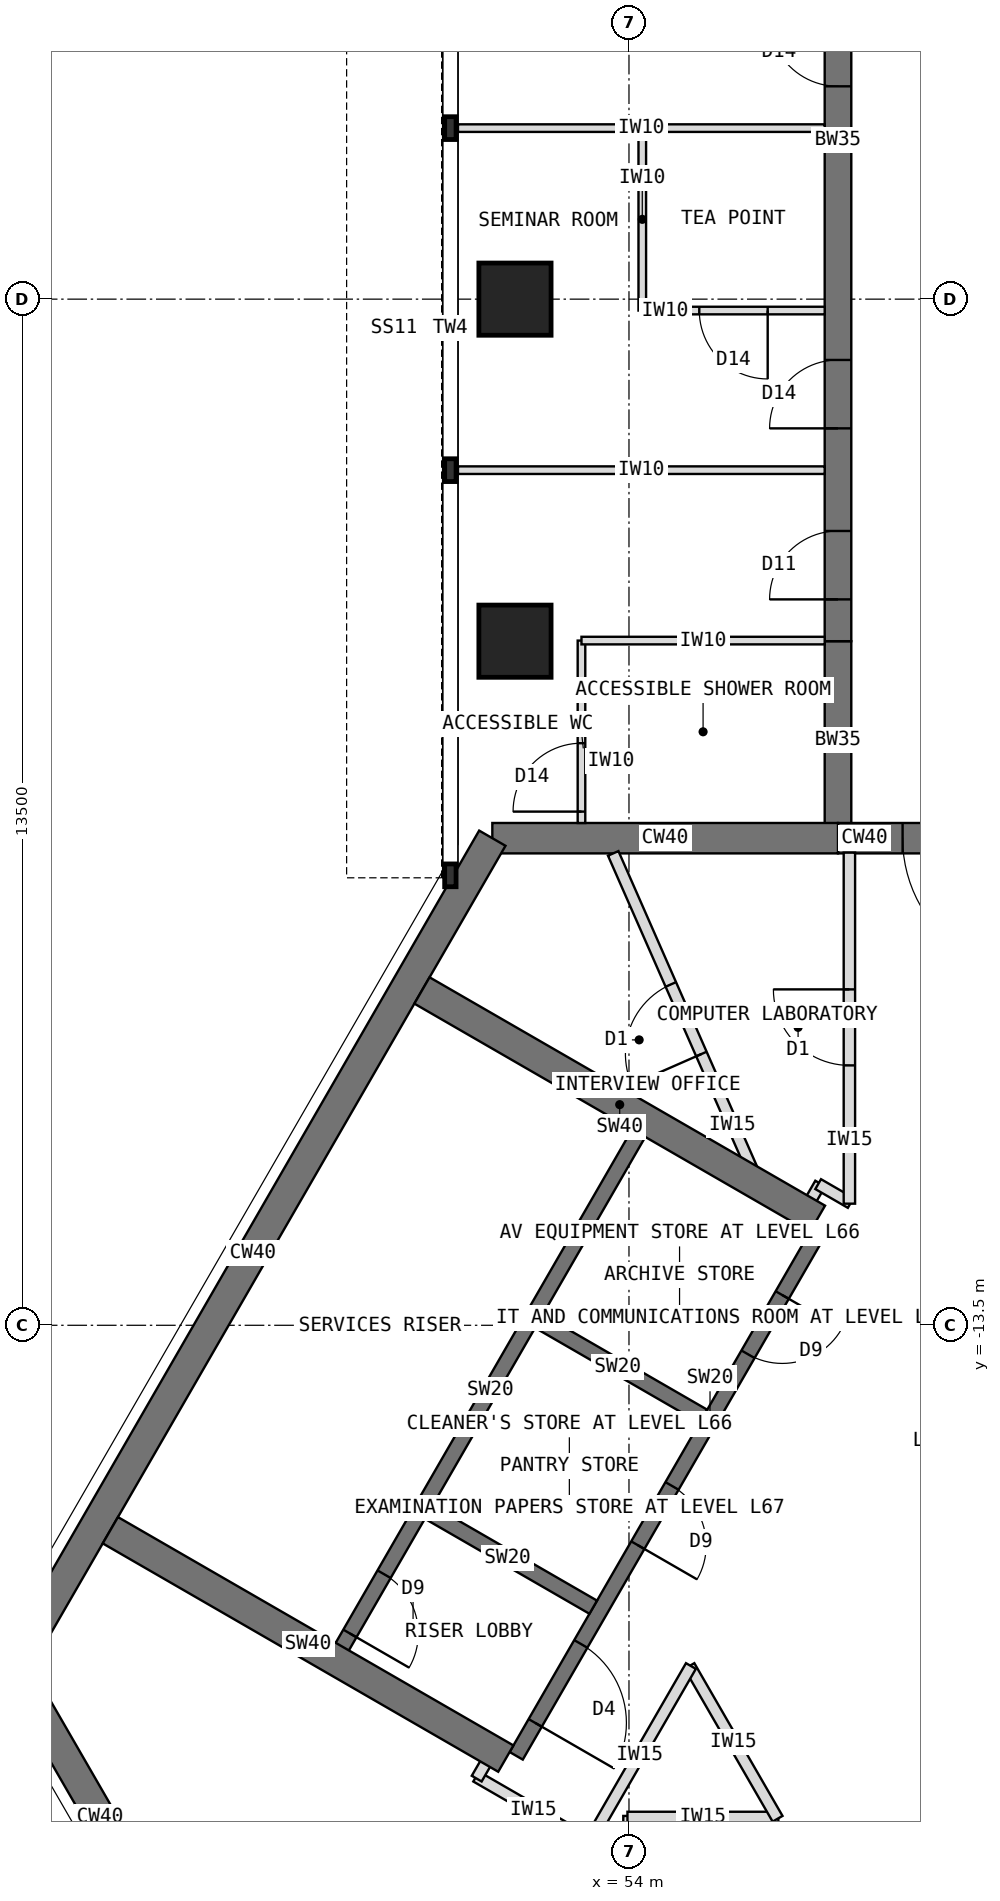
"""IFC4 building model, lengths in metres.
Left out: names, types, materials, properties, quantities, classifications, styles, units other than length and angle.
Written with IfcOpenShell. Run it as: python <this file> out.ifc"""

import sys

from ifc_helpers import new_model, si_unit, direction, frame, frame_2d, origin, origin_2d, place, context, subcontext, project, spatial, rectangle, extrude, element, fill, save


model = new_model("IFC4")
c1 = context("Model", 3, precision=1e-05, world=origin(), true_north=direction((0.0, 1.0)))
c2 = subcontext(c1, "Body", "Model", "MODEL_VIEW")
j1 = project(units=[si_unit("LENGTHUNIT", "METRE"), si_unit("PLANEANGLEUNIT", "RADIAN")], contexts=[c1])
p1 = place(None, origin())
s1 = spatial("IfcSite", under=j1, at=p1, CompositionType="ELEMENT")
p2 = place(p1, origin())
s2 = spatial("IfcBuilding", under=s1, at=p2, CompositionType="ELEMENT")
p3 = place(p2, frame((0.0, 0.0, 267.5)))
s3 = spatial("IfcBuildingStorey", under=s2, at=p3, CompositionType="ELEMENT", Elevation=267.5)
p4 = place(p3, frame((60.25, -7.092, 0.0), z_axis=(0.0, 0.0, 1.0), x_axis=(-1.0, 0.0, 0.0)))
e1 = element("IfcWall", 1, at=p4, inside=s3, PredefinedType="SHEAR", context=c2, shape_type="SweptSolid", body=[
    extrude(rectangle(XDim=3.5, YDim=0.4, at=frame_2d((1.75, 0.0))), origin(), (0.0, 0.0, 1.0), 4.0),
])
p5 = place(p4, frame((0.85, 0.0, 0.0)))
e2 = element("IfcOpeningElement", 2, at=p5, cuts=e1, PredefinedType="OPENING", context=c2, shape_type="SweptSolid", body=[
    extrude(rectangle(XDim=1.8, YDim=2.1, at=frame_2d((0.9, 1.05))), frame((0.0, 0.21, 0.0), z_axis=(0.0, -1.0, 0.0), x_axis=(1.0, 0.0, 0.0)), (0.0, 0.0, 1.0), 0.42),
])
p6 = place(p3, frame((56.75, -7.092, 0.0), z_axis=(0.0, 0.0, 1.0), x_axis=(-1.0, 0.0, 0.0)))
e3 = element("IfcWall", 3, at=p6, inside=s3, PredefinedType="SHEAR", context=c2, shape_type="SweptSolid", body=[
    extrude(rectangle(XDim=4.548, YDim=0.4, at=frame_2d((2.274, 0.0))), origin(), (0.0, 0.0, 1.0), 4.0),
])
p7 = place(p3, frame((52.202, -7.092, 0.0), z_axis=(0.0, 0.0, 1.0), x_axis=(-0.500005998175, -0.866021940709, 0.0)))
e4 = element("IfcWall", 4, at=p7, inside=s3, PredefinedType="SHEAR", context=c2, shape_type="SweptSolid", body=[
    extrude(rectangle(XDim=12.596, YDim=0.4, at=frame_2d((6.298, 0.0))), origin(), (0.0, 0.0, 1.0), 4.0),
])
p8 = place(p3, frame((45.904, -18.0, 0.0), z_axis=(0.0, 0.0, 1.0), x_axis=(0.500024481964, -0.866011268655, 0.0)))
e5 = element("IfcWall", 5, at=p8, inside=s3, PredefinedType="SHEAR", context=c2, shape_type="SweptSolid", body=[
    extrude(rectangle(XDim=4.548, YDim=0.4, at=frame_2d((2.274, 0.0))), origin(), (0.0, 0.0, 1.0), 4.0),
])
p9 = place(p3, frame((56.75, -7.092, 0.0), z_axis=(0.0, 0.0, 1.0), x_axis=(0.0, 1.0, 0.0)))
e6 = element("IfcWall", 6, at=p9, inside=s3, PredefinedType="SHEAR", context=c2, shape_type="SweptSolid", body=[
    extrude(rectangle(XDim=2.592, YDim=0.35, at=frame_2d((1.296, 0.0))), origin(), (0.0, 0.0, 1.0), 4.0),
])
p10 = place(p3, frame((56.75, -4.5, 0.0), z_axis=(0.0, 0.0, 1.0), x_axis=(0.0, 1.0, 0.0)))
e7 = element("IfcWall", 7, at=p10, inside=s3, PredefinedType="SHEAR", context=c2, shape_type="SweptSolid", body=[
    extrude(rectangle(XDim=13.2, YDim=0.35, at=frame_2d((6.6, 0.0))), origin(), (0.0, 0.0, 1.0), 4.0),
])
p11 = place(p10, frame((0.55, 0.0, 0.0)))
e8 = element("IfcOpeningElement", 8, at=p11, cuts=e7, PredefinedType="OPENING", context=c2, shape_type="SweptSolid", body=[
    extrude(rectangle(XDim=0.9, YDim=2.1, at=frame_2d((0.45, 1.05))), frame((0.0, 0.185, 0.0), z_axis=(0.0, -1.0, 0.0), x_axis=(1.0, 0.0, 0.0)), (0.0, 0.0, 1.0), 0.37),
])
p12 = place(p10, frame((2.8, 0.0, 0.0)))
e9 = element("IfcOpeningElement", 9, at=p12, cuts=e7, PredefinedType="OPENING", context=c2, shape_type="SweptSolid", body=[
    extrude(rectangle(XDim=0.9, YDim=2.1, at=frame_2d((0.45, 1.05))), frame((0.0, 0.185, 0.0), z_axis=(0.0, -1.0, 0.0), x_axis=(1.0, 0.0, 0.0)), (0.0, 0.0, 1.0), 0.37),
])
p13 = place(p10, frame((7.3, 0.0, 0.0)))
e10 = element("IfcOpeningElement", 10, at=p13, cuts=e7, PredefinedType="OPENING", context=c2, shape_type="SweptSolid", body=[
    extrude(rectangle(XDim=0.9, YDim=2.1, at=frame_2d((0.45, 1.05))), frame((0.0, 0.185, 0.0), z_axis=(0.0, -1.0, 0.0), x_axis=(1.0, 0.0, 0.0)), (0.0, 0.0, 1.0), 0.37),
])
for number, where, z_axis, x_axis in (
    (11, (52.5, -4.5, 0.0), (0.0, 0.0, 1.0), (1.0, 0.0, 0.0)),
    (12, (52.5, 0.0, 0.0), (0.0, 0.0, 1.0), (1.0, 0.0, 0.0)),
):
    element("IfcColumn", number, at=place(p3, frame(where, z_axis=z_axis, x_axis=x_axis)), inside=s3, PredefinedType="COLUMN", context=c2, shape_type="SweptSolid", body=[
        extrude(rectangle(XDim=0.95, YDim=0.95, at=origin_2d()), origin(), (0.0, 0.0, 1.0), 4.0),
    ])
p14 = place(p3, frame((56.516, -12.236, 0.0), z_axis=(0.0, 0.0, 1.0), x_axis=(-0.49999894854, -0.866026010844, 0.0)))
e13 = element("IfcWall", 13, at=p14, inside=s3, PredefinedType="SHEAR", context=c2, shape_type="SweptSolid", body=[
    extrude(rectangle(XDim=8.0, YDim=0.2, at=frame_2d((4.0, 0.0))), origin(), (0.0, 0.0, 1.0), 4.0),
])
p15 = place(p14, frame((6.3, 0.0, 0.0)))
e14 = element("IfcOpeningElement", 14, at=p15, cuts=e13, PredefinedType="OPENING", context=c2, shape_type="SweptSolid", body=[
    extrude(rectangle(XDim=1.2, YDim=2.1, at=frame_2d((0.6, 1.05))), frame((0.0, 0.11, 0.0), z_axis=(0.0, -1.0, 0.0), x_axis=(1.0, 0.0, 0.0)), (0.0, 0.0, 1.0), 0.22),
])
p16 = place(p14, frame((1.0, 0.0, 0.0)))
e15 = element("IfcOpeningElement", 15, at=p16, cuts=e13, PredefinedType="OPENING", context=c2, shape_type="SweptSolid", body=[
    extrude(rectangle(XDim=0.9, YDim=2.1, at=frame_2d((0.45, 1.05))), frame((0.0, 0.11, 0.0), z_axis=(0.0, -1.0, 0.0), x_axis=(1.0, 0.0, 0.0)), (0.0, 0.0, 1.0), 0.22),
])
p17 = place(p14, frame((3.9, 0.0, 0.0)))
e16 = element("IfcOpeningElement", 16, at=p17, cuts=e13, PredefinedType="OPENING", context=c2, shape_type="SweptSolid", body=[
    extrude(rectangle(XDim=0.9, YDim=2.1, at=frame_2d((0.45, 1.05))), frame((0.0, 0.11, 0.0), z_axis=(0.0, -1.0, 0.0), x_axis=(1.0, 0.0, 0.0)), (0.0, 0.0, 1.0), 0.22),
])
for number, where, z_axis, x_axis in (
    (17, (54.98, -14.697, 0.0), (0.0, 0.0, 1.0), (-0.866, 0.5, 0.0)),
    (18, (53.53, -17.209, 0.0), (0.0, 0.0, 1.0), (-0.866, 0.5, 0.0)),
):
    element("IfcWall", number, at=place(p3, frame(where, z_axis=z_axis, x_axis=x_axis)), inside=s3, PredefinedType="SHEAR", context=c2, shape_type="SweptSolid", body=[
        extrude(rectangle(XDim=2.6, YDim=0.2, at=frame_2d((1.3, 0.0))), origin(), (0.0, 0.0, 1.0), 4.0),
    ])
p18 = place(p3, frame((54.178, -10.886, 0.0), z_axis=(0.0, 0.0, 1.0), x_axis=(-0.49999894854, -0.866026010844, 0.0)))
e19 = element("IfcWall", 19, at=p18, inside=s3, PredefinedType="SHEAR", context=c2, shape_type="SweptSolid", body=[
    extrude(rectangle(XDim=8.0, YDim=0.2, at=frame_2d((4.0, 0.0))), origin(), (0.0, 0.0, 1.0), 4.0),
])
p19 = place(p18, frame((6.8, 0.0, 0.0)))
e20 = element("IfcOpeningElement", 20, at=p19, cuts=e19, PredefinedType="OPENING", context=c2, shape_type="SweptSolid", body=[
    extrude(rectangle(XDim=0.9, YDim=2.1, at=frame_2d((0.45, 1.05))), frame((0.0, 0.11, 0.0), z_axis=(0.0, -1.0, 0.0), x_axis=(1.0, 0.0, 0.0)), (0.0, 0.0, 1.0), 0.22),
])
for number, where, z_axis, x_axis in (
    (21, (52.38, -19.201, 0.0), (0.0, 0.0, 1.0), (-0.866, 0.5, 0.0)),
    (22, (56.48, -12.099, 0.0), (0.0, 0.0, 1.0), (-0.866, 0.5, 0.0)),
):
    element("IfcWall", number, at=place(p3, frame(where, z_axis=z_axis, x_axis=x_axis)), inside=s3, PredefinedType="SHEAR", context=c2, shape_type="SweptSolid", body=[
        extrude(rectangle(XDim=6.008, YDim=0.4, at=frame_2d((3.004, 0.0))), origin(), (0.0, 0.0, 1.0), 4.0),
    ])
for number, where, z_axis, x_axis in (
    (23, (56.575, -2.25, 0.0), (0.0, 0.0, 1.0), (-1.0, 0.0, 0.0)),
    (24, (56.575, 2.25, 0.0), (0.0, 0.0, 1.0), (-1.0, 0.0, 0.0)),
):
    element("IfcWall", number, at=place(p3, frame(where, z_axis=z_axis, x_axis=x_axis)), inside=s3, PredefinedType="PARTITIONING", context=c2, shape_type="SweptSolid", body=[
        extrude(rectangle(XDim=4.825, YDim=0.1, at=frame_2d((2.413, 0.0))), origin(), (0.0, 0.0, 1.0), 3.8),
    ])
p20 = place(p3, frame((54.175, -0.15, 0.0), z_axis=(0.0, 0.0, 1.0), x_axis=(0.0, 1.0, 0.0)))
e25 = element("IfcWall", 25, at=p20, inside=s3, PredefinedType="PARTITIONING", context=c2, shape_type="SweptSolid", body=[
    extrude(rectangle(XDim=2.4, YDim=0.1, at=frame_2d((1.2, 0.0))), origin(), (0.0, 0.0, 1.0), 3.8),
])
p21 = place(p3, frame((56.575, -0.15, 0.0), z_axis=(0.0, 0.0, 1.0), x_axis=(-1.0, 0.0, 0.0)))
e26 = element("IfcWall", 26, at=p21, inside=s3, PredefinedType="PARTITIONING", context=c2, shape_type="SweptSolid", body=[
    extrude(rectangle(XDim=2.4, YDim=0.1, at=frame_2d((1.2, 0.0))), origin(), (0.0, 0.0, 1.0), 3.8),
])
p22 = place(p21, frame((0.75, 0.0, 0.0)))
e27 = element("IfcOpeningElement", 27, at=p22, cuts=e26, PredefinedType="OPENING", context=c2, shape_type="SweptSolid", body=[
    extrude(rectangle(XDim=0.9, YDim=2.1, at=frame_2d((0.45, 1.05))), frame((0.0, 0.06, 0.0), z_axis=(0.0, -1.0, 0.0), x_axis=(1.0, 0.0, 0.0)), (0.0, 0.0, 1.0), 0.12),
])
p23 = place(p3, frame((53.375, -6.892, 0.0), z_axis=(0.0, 0.0, 1.0), x_axis=(0.0, 1.0, 0.0)))
e28 = element("IfcWall", 28, at=p23, inside=s3, PredefinedType="PARTITIONING", context=c2, shape_type="SweptSolid", body=[
    extrude(rectangle(XDim=2.4, YDim=0.1, at=frame_2d((1.2, 0.0))), origin(), (0.0, 0.0, 1.0), 3.8),
])
p24 = place(p23, frame((0.15, 0.0, 0.0)))
e29 = element("IfcOpeningElement", 29, at=p24, cuts=e28, PredefinedType="OPENING", context=c2, shape_type="SweptSolid", body=[
    extrude(rectangle(XDim=0.9, YDim=2.1, at=frame_2d((0.45, 1.05))), frame((0.0, 0.06, 0.0), z_axis=(0.0, -1.0, 0.0), x_axis=(1.0, 0.0, 0.0)), (0.0, 0.0, 1.0), 0.12),
])
p25 = place(p3, frame((56.575, -4.492, 0.0), z_axis=(0.0, 0.0, 1.0), x_axis=(-1.0, 0.0, 0.0)))
e30 = element("IfcWall", 30, at=p25, inside=s3, PredefinedType="PARTITIONING", context=c2, shape_type="SweptSolid", body=[
    extrude(rectangle(XDim=3.2, YDim=0.1, at=frame_2d((1.6, 0.0))), origin(), (0.0, 0.0, 1.0), 3.267),
])
p26 = place(p3, frame((54.0, -22.92, 0.0), z_axis=(0.0, 0.0, 1.0), x_axis=(0.0, 1.0, 0.0)))
e31 = element("IfcWall", 31, at=p26, inside=s3, PredefinedType="PARTITIONING", context=c2, shape_type="SweptSolid", body=[
    extrude(rectangle(XDim=2.965, YDim=0.15, at=frame_2d((1.482, 0.0))), origin(), (0.0, 0.0, 1.0), 3.8),
])
p27 = place(p26, frame((0.982, 0.0, 0.0)))
e32 = element("IfcOpeningElement", 32, at=p27, cuts=e31, PredefinedType="OPENING", context=c2, shape_type="SweptSolid", body=[
    extrude(rectangle(XDim=1.0, YDim=2.1, at=frame_2d((0.5, 1.05))), frame((0.0, 0.085, 0.0), z_axis=(0.0, -1.0, 0.0), x_axis=(1.0, 0.0, 0.0)), (0.0, 0.0, 1.0), 0.17),
])
p28 = place(p3, frame((53.98, -19.975, 0.0), z_axis=(0.0, 0.0, 1.0), x_axis=(1.0, 0.0, 0.0)))
e33 = element("IfcWall", 33, at=p28, inside=s3, PredefinedType="PARTITIONING", context=c2, shape_type="SweptSolid", body=[
    extrude(rectangle(XDim=1.985, YDim=0.15, at=frame_2d((0.993, 0.0))), origin(), (0.0, 0.0, 1.0), 3.8),
])
p29 = place(p3, frame((55.955, -19.992, 0.0), z_axis=(0.0, 0.0, 1.0), x_axis=(-0.499941024108, 0.866059450854, 0.0)))
e34 = element("IfcWall", 34, at=p29, inside=s3, PredefinedType="PARTITIONING", context=c2, shape_type="SweptSolid", body=[
    extrude(rectangle(XDim=2.321, YDim=0.15, at=frame_2d((1.16, 0.0))), origin(), (0.0, 0.0, 1.0), 3.8),
])
p30 = place(p3, frame((54.815, -17.983, 0.0), z_axis=(0.0, 0.0, 1.0), x_axis=(-0.499981473571, -0.866036099759, 0.0)))
e35 = element("IfcWall", 35, at=p30, inside=s3, PredefinedType="PARTITIONING", context=c2, shape_type="SweptSolid", body=[
    extrude(rectangle(XDim=2.692, YDim=0.15, at=frame_2d((1.346, 0.0))), origin(), (0.0, 0.0, 1.0), 3.8),
])
p31 = place(p3, frame((53.496, -20.307, 0.0), z_axis=(0.0, 0.0, 1.0), x_axis=(-0.865989304205, 0.500062521093, 0.0)))
e36 = element("IfcWall", 36, at=p31, inside=s3, PredefinedType="PARTITIONING", context=c2, shape_type="SweptSolid", body=[
    extrude(rectangle(XDim=1.74, YDim=0.15, at=frame_2d((0.87, 0.0))), origin(), (0.0, 0.0, 1.0), 3.8),
])
for number, where, z_axis, x_axis in (
    (37, (51.997, -19.464, 0.0), (0.0, 0.0, 1.0), (0.5, 0.866, 0.0)),
    (38, (56.302, -12.008, 0.0), (0.0, 0.0, 1.0), (0.5, 0.866, 0.0)),
):
    element("IfcWall", number, at=place(p3, frame(where, z_axis=z_axis, x_axis=x_axis)), inside=s3, PredefinedType="PARTITIONING", context=c2, shape_type="SweptSolid", body=[
        extrude(rectangle(XDim=0.43, YDim=0.15, at=frame_2d((0.215, 0.0))), origin(), (0.0, 0.0, 1.0), 3.8),
    ])
p32 = place(p3, frame((56.489, -11.643, 0.0), z_axis=(0.0, 0.0, 1.0), x_axis=(0.865831790172, -0.50033519877, 0.0)))
e39 = element("IfcWall", 39, at=p32, inside=s3, PredefinedType="PARTITIONING", context=c2, shape_type="SweptSolid", body=[
    extrude(rectangle(XDim=0.494, YDim=0.15, at=frame_2d((0.247, 0.0))), origin(), (0.0, 0.0, 1.0), 3.8),
])
p33 = place(p3, frame((56.9, -11.9, 0.0), z_axis=(0.0, 0.0, 1.0), x_axis=(0.0, 1.0, 0.0)))
e40 = element("IfcWall", 40, at=p33, inside=s3, PredefinedType="PARTITIONING", context=c2, shape_type="SweptSolid", body=[
    extrude(rectangle(XDim=4.618, YDim=0.15, at=frame_2d((2.309, 0.0))), origin(), (0.0, 0.0, 1.0), 3.8),
])
p34 = place(p33, frame((1.819, 0.0, 0.0)))
e41 = element("IfcOpeningElement", 41, at=p34, cuts=e40, PredefinedType="OPENING", context=c2, shape_type="SweptSolid", body=[
    extrude(rectangle(XDim=1.0, YDim=2.1, at=frame_2d((0.5, 1.05))), frame((0.0, 0.085, 0.0), z_axis=(0.0, -1.0, 0.0), x_axis=(1.0, 0.0, 0.0)), (0.0, 0.0, 1.0), 0.17),
])
p35 = place(p3, frame((55.711, -11.656, 0.0), z_axis=(0.0, 0.0, 1.0), x_axis=(-0.402457111937, 0.915438841787, 0.0)))
e42 = element("IfcWall", 42, at=p35, inside=s3, PredefinedType="PARTITIONING", context=c2, shape_type="SweptSolid", body=[
    extrude(rectangle(XDim=4.767, YDim=0.15, at=frame_2d((2.383, 0.0))), origin(), (0.0, 0.0, 1.0), 3.8),
])
p36 = place(p35, frame((1.883, 0.0, 0.0)))
e43 = element("IfcOpeningElement", 43, at=p36, cuts=e42, PredefinedType="OPENING", context=c2, shape_type="SweptSolid", body=[
    extrude(rectangle(XDim=1.0, YDim=2.1, at=frame_2d((0.5, 1.05))), frame((0.0, 0.085, 0.0), z_axis=(0.0, -1.0, 0.0), x_axis=(1.0, 0.0, 0.0)), (0.0, 0.0, 1.0), 0.17),
])
p37 = place(p15, origin())
e44 = element("IfcDoor", 44, at=p37, inside=s3, OperationType="SINGLE_SWING_RIGHT", PredefinedType="DOOR", context=c2, shape_type="SweptSolid", body=[
    extrude(rectangle(XDim=1.2, YDim=2.1, at=frame_2d((0.6, 1.05))), frame((0.0, 0.025, 0.0), z_axis=(0.0, -1.0, 0.0), x_axis=(1.0, 0.0, 0.0)), (0.0, 0.0, 1.0), 0.05),
])
fill(e14, e44)
p38 = place(p19, origin())
e45 = element("IfcDoor", 45, at=p38, inside=s3, OperationType="SINGLE_SWING_RIGHT", PredefinedType="DOOR", context=c2, shape_type="SweptSolid", body=[
    extrude(rectangle(XDim=0.9, YDim=2.1, at=frame_2d((0.45, 1.05))), frame((0.0, 0.025, 0.0), z_axis=(0.0, -1.0, 0.0), x_axis=(1.0, 0.0, 0.0)), (0.0, 0.0, 1.0), 0.05),
])
fill(e20, e45)
p39 = place(p5, origin())
e46 = element("IfcDoor", 46, at=p39, inside=s3, OperationType="DOUBLE_DOOR_DOUBLE_SWING", PredefinedType="DOOR", context=c2, shape_type="SweptSolid", body=[
    extrude(rectangle(XDim=1.8, YDim=2.1, at=frame_2d((0.9, 1.05))), frame((0.0, 0.025, 0.0), z_axis=(0.0, -1.0, 0.0), x_axis=(1.0, 0.0, 0.0)), (0.0, 0.0, 1.0), 0.05),
])
fill(e2, e46)
p40 = place(p22, origin())
e47 = element("IfcDoor", 47, at=p40, inside=s3, OperationType="SINGLE_SWING_LEFT", PredefinedType="DOOR", context=c2, shape_type="SweptSolid", body=[
    extrude(rectangle(XDim=0.9, YDim=2.1, at=frame_2d((0.45, 1.05))), frame((0.0, 0.025, 0.0), z_axis=(0.0, -1.0, 0.0), x_axis=(1.0, 0.0, 0.0)), (0.0, 0.0, 1.0), 0.05),
])
fill(e27, e47)
p41 = place(p24, origin())
e48 = element("IfcDoor", 48, at=p41, inside=s3, OperationType="SINGLE_SWING_LEFT", PredefinedType="DOOR", context=c2, shape_type="SweptSolid", body=[
    extrude(rectangle(XDim=0.9, YDim=2.1, at=frame_2d((0.45, 1.05))), frame((0.0, 0.025, 0.0), z_axis=(0.0, -1.0, 0.0), x_axis=(1.0, 0.0, 0.0)), (0.0, 0.0, 1.0), 0.05),
])
fill(e29, e48)
p42 = place(p36, origin())
e49 = element("IfcDoor", 49, at=p42, inside=s3, OperationType="SINGLE_SWING_LEFT", PredefinedType="DOOR", context=c2, shape_type="SweptSolid", body=[
    extrude(rectangle(XDim=1.0, YDim=2.1, at=frame_2d((0.5, 1.05))), frame((0.0, 0.025, 0.0), z_axis=(0.0, -1.0, 0.0), x_axis=(1.0, 0.0, 0.0)), (0.0, 0.0, 1.0), 0.05),
])
fill(e43, e49)
p43 = place(p34, origin())
e50 = element("IfcDoor", 50, at=p43, inside=s3, OperationType="SINGLE_SWING_RIGHT", PredefinedType="DOOR", context=c2, shape_type="SweptSolid", body=[
    extrude(rectangle(XDim=1.0, YDim=2.1, at=frame_2d((0.5, 1.05))), frame((0.0, 0.025, 0.0), z_axis=(0.0, -1.0, 0.0), x_axis=(1.0, 0.0, 0.0)), (0.0, 0.0, 1.0), 0.05),
])
fill(e41, e50)
p44 = place(p11, origin())
e51 = element("IfcDoor", 51, at=p44, inside=s3, OperationType="SINGLE_SWING_LEFT", PredefinedType="DOOR", context=c2, shape_type="SweptSolid", body=[
    extrude(rectangle(XDim=0.9, YDim=2.1, at=frame_2d((0.45, 1.05))), frame((0.0, 0.025, 0.0), z_axis=(0.0, -1.0, 0.0), x_axis=(1.0, 0.0, 0.0)), (0.0, 0.0, 1.0), 0.05),
])
fill(e8, e51)
p45 = place(p12, origin())
e52 = element("IfcDoor", 52, at=p45, inside=s3, OperationType="SINGLE_SWING_LEFT", PredefinedType="DOOR", context=c2, shape_type="SweptSolid", body=[
    extrude(rectangle(XDim=0.9, YDim=2.1, at=frame_2d((0.45, 1.05))), frame((0.0, 0.025, 0.0), z_axis=(0.0, -1.0, 0.0), x_axis=(1.0, 0.0, 0.0)), (0.0, 0.0, 1.0), 0.05),
])
fill(e9, e52)
p46 = place(p13, origin())
e53 = element("IfcDoor", 53, at=p46, inside=s3, OperationType="SINGLE_SWING_RIGHT", PredefinedType="DOOR", context=c2, shape_type="SweptSolid", body=[
    extrude(rectangle(XDim=0.9, YDim=2.1, at=frame_2d((0.45, 1.05))), frame((0.0, 0.025, 0.0), z_axis=(0.0, -1.0, 0.0), x_axis=(1.0, 0.0, 0.0)), (0.0, 0.0, 1.0), 0.05),
])
fill(e10, e53)
p47 = place(p16, origin())
e54 = element("IfcDoor", 54, at=p47, inside=s3, OperationType="SINGLE_SWING_LEFT", PredefinedType="DOOR", context=c2, shape_type="SweptSolid", body=[
    extrude(rectangle(XDim=0.9, YDim=2.1, at=frame_2d((0.45, 1.05))), frame((0.0, 0.025, 0.0), z_axis=(0.0, -1.0, 0.0), x_axis=(1.0, 0.0, 0.0)), (0.0, 0.0, 1.0), 0.05),
])
fill(e15, e54)
p48 = place(p17, origin())
e55 = element("IfcDoor", 55, at=p48, inside=s3, OperationType="SINGLE_SWING_RIGHT", PredefinedType="DOOR", context=c2, shape_type="SweptSolid", body=[
    extrude(rectangle(XDim=0.9, YDim=2.1, at=frame_2d((0.45, 1.05))), frame((0.0, 0.025, 0.0), z_axis=(0.0, -1.0, 0.0), x_axis=(1.0, 0.0, 0.0)), (0.0, 0.0, 1.0), 0.05),
])
fill(e16, e55)
save(model, sys.argv[1])
